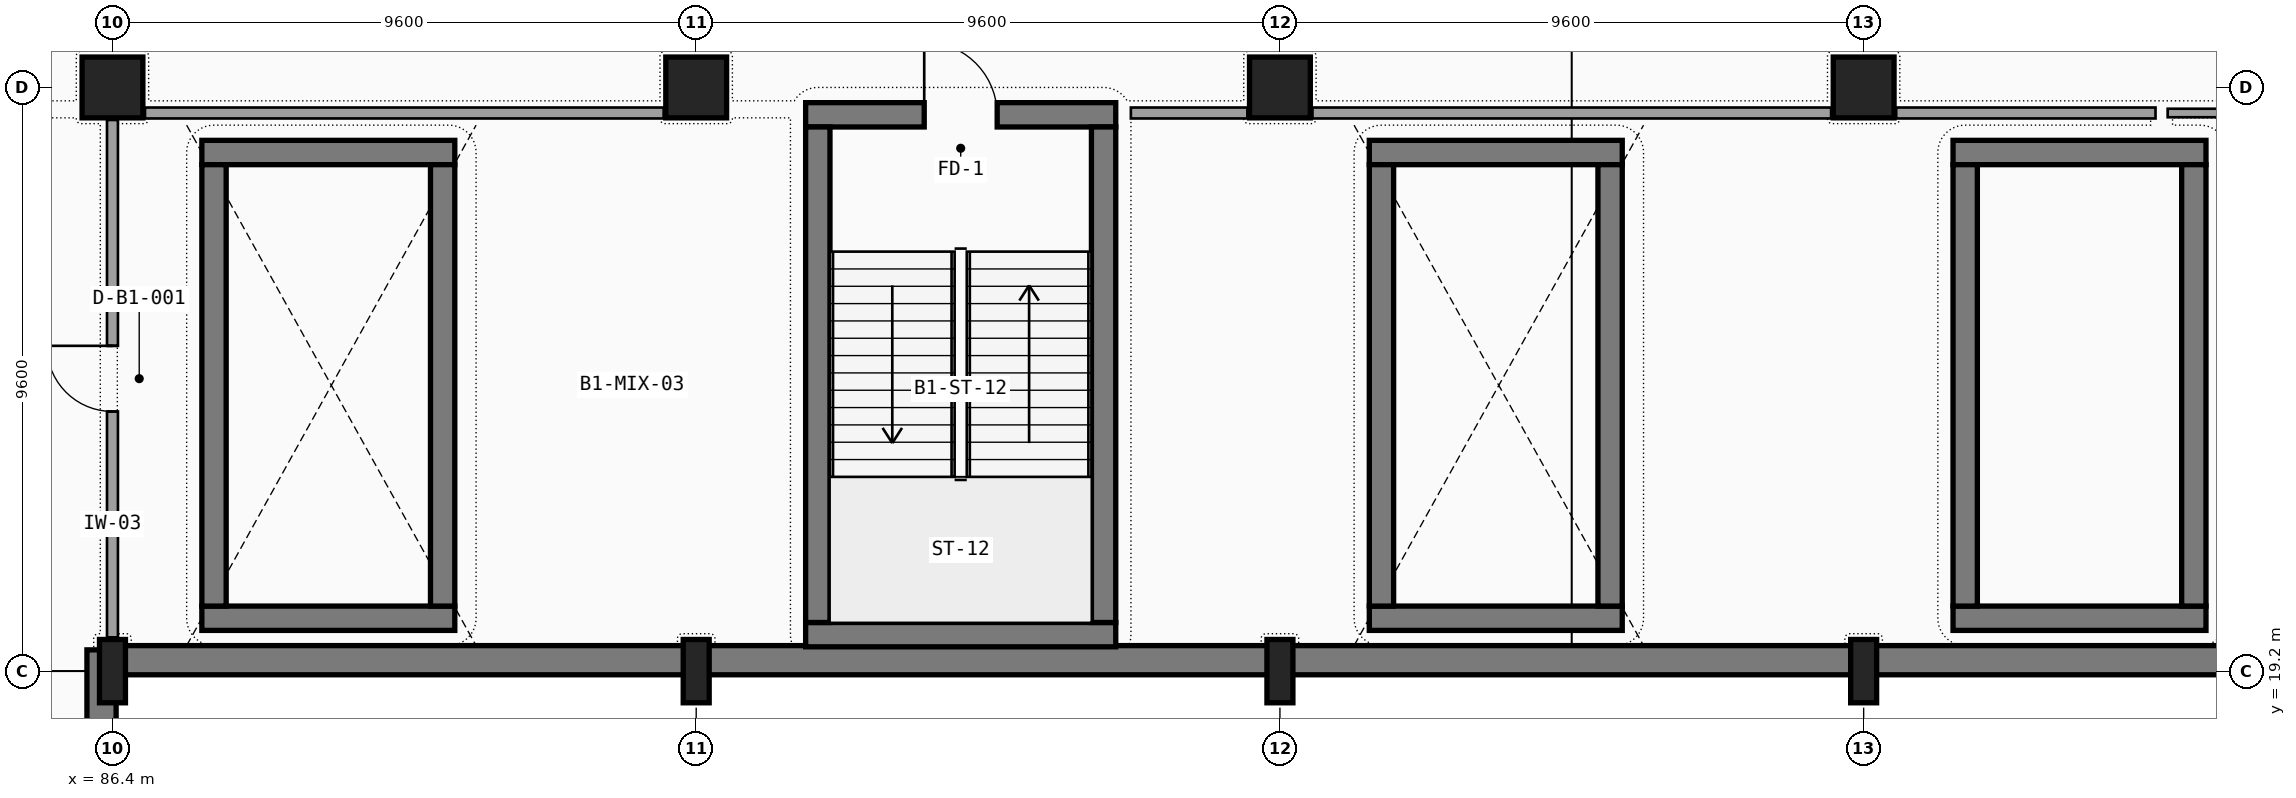
"""IFC4 building model, lengths in metres.
Left out: names, types, materials, properties, quantities, classifications, styles, units other than length and angle.
Written with IfcOpenShell. Run it as: python <this file> out.ifc"""

import sys

from ifc_helpers import new_model, si_unit, direction, frame, frame_2d, origin, origin_2d, place, context, subcontext, project, spatial, rectangle, i_section, extrude, element, fill, save


model = new_model("IFC4")
c1 = context("Model", 3, precision=1e-05, world=origin(), true_north=direction((0.0, 1.0)))
c2 = subcontext(c1, "Body", "Model", "MODEL_VIEW")
j1 = project(units=[si_unit("LENGTHUNIT", "METRE"), si_unit("PLANEANGLEUNIT", "RADIAN")], contexts=[c1])
p1 = place(None, origin())
s1 = spatial("IfcSite", under=j1, at=p1, CompositionType="ELEMENT")
p2 = place(p1, origin())
s2 = spatial("IfcBuilding", under=s1, at=p2, CompositionType="ELEMENT")
p3 = place(p2, frame((0.0, 0.0, -4.8)))
s3 = spatial("IfcBuildingStorey", under=s2, at=p3, CompositionType="ELEMENT", Elevation=-4.8)
p4 = place(p3, frame((86.4, 19.2, 0.0), z_axis=(0.0, 0.0, 1.0), x_axis=(1.0, 0.0, 0.0)))
e1 = element("IfcColumn", 1, at=p4, inside=s3, PredefinedType="COLUMN", context=c2, shape_type="SweptSolid", body=[
    extrude(i_section(OverallWidth=0.427, OverallDepth=1.042, WebThickness=0.031, FlangeThickness=0.056, FilletRadius=0.031, at=origin_2d()), origin(), (0.0, 0.0, 1.0), 4.8),
])
p5 = place(p3, frame((86.4, 28.8, 0.0), z_axis=(0.0, 0.0, 1.0), x_axis=(1.0, 0.0, 0.0)))
e2 = element("IfcColumn", 2, at=p5, inside=s3, PredefinedType="COLUMN", context=c2, shape_type="SweptSolid", body=[
    extrude(rectangle(XDim=1.0, YDim=1.0, at=origin_2d()), origin(), (0.0, 0.0, 1.0), 4.8),
])
p6 = place(p3, frame((96.0, 19.2, 0.0), z_axis=(0.0, 0.0, 1.0), x_axis=(1.0, 0.0, 0.0)))
e3 = element("IfcColumn", 3, at=p6, inside=s3, PredefinedType="COLUMN", context=c2, shape_type="SweptSolid", body=[
    extrude(i_section(OverallWidth=0.427, OverallDepth=1.042, WebThickness=0.031, FlangeThickness=0.056, FilletRadius=0.031, at=origin_2d()), origin(), (0.0, 0.0, 1.0), 4.8),
])
p7 = place(p3, frame((96.0, 28.8, 0.0), z_axis=(0.0, 0.0, 1.0), x_axis=(1.0, 0.0, 0.0)))
e4 = element("IfcColumn", 4, at=p7, inside=s3, PredefinedType="COLUMN", context=c2, shape_type="SweptSolid", body=[
    extrude(rectangle(XDim=1.0, YDim=1.0, at=origin_2d()), origin(), (0.0, 0.0, 1.0), 4.8),
])
p8 = place(p3, frame((105.6, 19.2, 0.0), z_axis=(0.0, 0.0, 1.0), x_axis=(1.0, 0.0, 0.0)))
e5 = element("IfcColumn", 5, at=p8, inside=s3, PredefinedType="COLUMN", context=c2, shape_type="SweptSolid", body=[
    extrude(i_section(OverallWidth=0.427, OverallDepth=1.042, WebThickness=0.031, FlangeThickness=0.056, FilletRadius=0.031, at=origin_2d()), origin(), (0.0, 0.0, 1.0), 4.8),
])
p9 = place(p3, frame((105.6, 28.8, 0.0), z_axis=(0.0, 0.0, 1.0), x_axis=(1.0, 0.0, 0.0)))
e6 = element("IfcColumn", 6, at=p9, inside=s3, PredefinedType="COLUMN", context=c2, shape_type="SweptSolid", body=[
    extrude(rectangle(XDim=1.0, YDim=1.0, at=origin_2d()), origin(), (0.0, 0.0, 1.0), 4.8),
])
p10 = place(p3, frame((115.2, 19.2, 0.0), z_axis=(0.0, 0.0, 1.0), x_axis=(1.0, 0.0, 0.0)))
e7 = element("IfcColumn", 7, at=p10, inside=s3, PredefinedType="COLUMN", context=c2, shape_type="SweptSolid", body=[
    extrude(i_section(OverallWidth=0.427, OverallDepth=1.042, WebThickness=0.031, FlangeThickness=0.056, FilletRadius=0.031, at=origin_2d()), origin(), (0.0, 0.0, 1.0), 4.8),
])
p11 = place(p3, frame((115.2, 28.8, 0.0), z_axis=(0.0, 0.0, 1.0), x_axis=(1.0, 0.0, 0.0)))
e8 = element("IfcColumn", 8, at=p11, inside=s3, PredefinedType="COLUMN", context=c2, shape_type="SweptSolid", body=[
    extrude(rectangle(XDim=1.0, YDim=1.0, at=origin_2d()), origin(), (0.0, 0.0, 1.0), 4.8),
])
p12 = place(p3, frame((86.22, 9.6, 0.0), z_axis=(0.0, 0.0, 1.0), x_axis=(0.0, 1.0, 0.0)))
e9 = element("IfcWall", 9, at=p12, inside=s3, PredefinedType="USERDEFINED", context=c2, shape_type="SweptSolid", body=[
    extrude(rectangle(XDim=9.95, YDim=0.48, at=frame_2d((4.975, 0.0))), origin(), (0.0, 0.0, 1.0), 3.573),
])
for number, where, z_axis, x_axis in (
    (10, (86.4, 19.38, 0.0), (0.0, 0.0, 1.0), (1.0, 0.0, 0.0)),
    (11, (96.0, 19.38, 0.0), (0.0, 0.0, 1.0), (1.0, 0.0, 0.0)),
):
    element("IfcWall", number, at=place(p3, frame(where, z_axis=z_axis, x_axis=x_axis)), inside=s3, PredefinedType="USERDEFINED", context=c2, shape_type="SweptSolid", body=[
        extrude(rectangle(XDim=9.6, YDim=0.48, at=frame_2d((4.8, 0.0))), origin(), (0.0, 0.0, 1.0), 3.573),
    ])
p13 = place(p3, frame((105.6, 19.38, 0.0), z_axis=(0.0, 0.0, 1.0), x_axis=(1.0, 0.0, 0.0)))
e12 = element("IfcWall", 12, at=p13, inside=s3, PredefinedType="USERDEFINED", context=c2, shape_type="SweptSolid", body=[
    extrude(rectangle(XDim=9.6, YDim=0.48, at=frame_2d((4.8, 0.0))), origin(), (0.0, 0.0, 1.0), 3.573),
])
p14 = place(p3, frame((115.2, 19.38, 0.0), z_axis=(0.0, 0.0, 1.0), x_axis=(1.0, 0.0, 0.0)))
e13 = element("IfcWall", 13, at=p14, inside=s3, PredefinedType="USERDEFINED", context=c2, shape_type="SweptSolid", body=[
    extrude(rectangle(XDim=9.6, YDim=0.48, at=frame_2d((4.8, 0.0))), origin(), (0.0, 0.0, 1.0), 3.573),
])
p15 = place(p3, frame((97.8, 19.8, 0.0), z_axis=(0.0, 0.0, 1.0), x_axis=(1.0, 0.0, 0.0)))
e14 = element("IfcWall", 14, at=p15, inside=s3, PredefinedType="SHEAR", context=c2, shape_type="SweptSolid", body=[
    extrude(rectangle(XDim=5.1, YDim=0.4, at=frame_2d((2.55, 0.0))), origin(), (0.0, 0.0, 1.0), 4.5),
])
p16 = place(p3, frame((102.9, 28.35, 0.0), z_axis=(0.0, 0.0, 1.0), x_axis=(-1.0, 0.0, 0.0)))
e15 = element("IfcWall", 15, at=p16, inside=s3, PredefinedType="SHEAR", context=c2, shape_type="SweptSolid", body=[
    extrude(rectangle(XDim=5.1, YDim=0.4, at=frame_2d((2.55, 0.0))), origin(), (0.0, 0.0, 1.0), 4.5),
])
p17 = place(p16, frame((3.15, 0.0, 0.0), z_axis=(0.0, 0.0, 1.0), x_axis=(-1.0, 0.0, 0.0)))
e16 = element("IfcOpeningElement", 16, at=p17, cuts=e15, PredefinedType="OPENING", context=c2, shape_type="SweptSolid", body=[
    extrude(rectangle(XDim=1.2, YDim=2.2, at=frame_2d((0.6, 1.1))), frame((0.0, 0.21, 0.0), z_axis=(0.0, -1.0, 0.0), x_axis=(1.0, 0.0, 0.0)), (0.0, 0.0, 1.0), 0.42),
])
for number, where, z_axis, x_axis in (
    (17, (98.0, 28.15, 0.0), (0.0, 0.0, 1.0), (0.0, -1.0, 0.0)),
    (18, (102.7, 20.0, 0.0), (0.0, 0.0, 1.0), (0.0, 1.0, 0.0)),
):
    element("IfcWall", number, at=place(p3, frame(where, z_axis=z_axis, x_axis=x_axis)), inside=s3, PredefinedType="SHEAR", context=c2, shape_type="SweptSolid", body=[
        extrude(rectangle(XDim=8.15, YDim=0.4, at=frame_2d((4.075, 0.0))), origin(), (0.0, 0.0, 1.0), 4.5),
    ])
for number, where, z_axis, x_axis in (
    (19, (87.87, 20.07, 0.0), (0.0, 0.0, 1.0), (1.0, 0.0, 0.0)),
    (20, (92.03, 27.73, 0.0), (0.0, 0.0, 1.0), (-1.0, 0.0, 0.0)),
):
    element("IfcWall", number, at=place(p3, frame(where, z_axis=z_axis, x_axis=x_axis)), inside=s3, PredefinedType="SHEAR", context=c2, shape_type="SweptSolid", body=[
        extrude(rectangle(XDim=4.16, YDim=0.4, at=frame_2d((2.08, 0.0))), origin(), (0.0, 0.0, 1.0), 4.5),
    ])
for number, where, z_axis, x_axis in (
    (21, (88.07, 27.53, 0.0), (0.0, 0.0, 1.0), (0.0, -1.0, 0.0)),
    (22, (91.83, 20.27, 0.0), (0.0, 0.0, 1.0), (0.0, 1.0, 0.0)),
):
    element("IfcWall", number, at=place(p3, frame(where, z_axis=z_axis, x_axis=x_axis)), inside=s3, PredefinedType="SHEAR", context=c2, shape_type="SweptSolid", body=[
        extrude(rectangle(XDim=7.26, YDim=0.4, at=frame_2d((3.63, 0.0))), origin(), (0.0, 0.0, 1.0), 4.5),
    ])
for number, where, z_axis, x_axis in (
    (23, (107.07, 20.07, 0.0), (0.0, 0.0, 1.0), (1.0, 0.0, 0.0)),
    (24, (111.23, 27.73, 0.0), (0.0, 0.0, 1.0), (-1.0, 0.0, 0.0)),
):
    element("IfcWall", number, at=place(p3, frame(where, z_axis=z_axis, x_axis=x_axis)), inside=s3, PredefinedType="SHEAR", context=c2, shape_type="SweptSolid", body=[
        extrude(rectangle(XDim=4.16, YDim=0.4, at=frame_2d((2.08, 0.0))), origin(), (0.0, 0.0, 1.0), 4.5),
    ])
for number, where, z_axis, x_axis in (
    (25, (107.27, 27.53, 0.0), (0.0, 0.0, 1.0), (0.0, -1.0, 0.0)),
    (26, (111.03, 20.27, 0.0), (0.0, 0.0, 1.0), (0.0, 1.0, 0.0)),
):
    element("IfcWall", number, at=place(p3, frame(where, z_axis=z_axis, x_axis=x_axis)), inside=s3, PredefinedType="SHEAR", context=c2, shape_type="SweptSolid", body=[
        extrude(rectangle(XDim=7.26, YDim=0.4, at=frame_2d((3.63, 0.0))), origin(), (0.0, 0.0, 1.0), 4.5),
    ])
for number, where, z_axis, x_axis in (
    (27, (116.67, 20.07, 0.0), (0.0, 0.0, 1.0), (1.0, 0.0, 0.0)),
    (28, (120.83, 27.73, 0.0), (0.0, 0.0, 1.0), (-1.0, 0.0, 0.0)),
):
    element("IfcWall", number, at=place(p3, frame(where, z_axis=z_axis, x_axis=x_axis)), inside=s3, PredefinedType="SHEAR", context=c2, shape_type="SweptSolid", body=[
        extrude(rectangle(XDim=4.16, YDim=0.4, at=frame_2d((2.08, 0.0))), origin(), (0.0, 0.0, 1.0), 4.5),
    ])
for number, where, z_axis, x_axis in (
    (29, (116.87, 27.53, 0.0), (0.0, 0.0, 1.0), (0.0, -1.0, 0.0)),
    (30, (120.63, 20.27, 0.0), (0.0, 0.0, 1.0), (0.0, 1.0, 0.0)),
):
    element("IfcWall", number, at=place(p3, frame(where, z_axis=z_axis, x_axis=x_axis)), inside=s3, PredefinedType="SHEAR", context=c2, shape_type="SweptSolid", body=[
        extrude(rectangle(XDim=7.26, YDim=0.4, at=frame_2d((3.63, 0.0))), origin(), (0.0, 0.0, 1.0), 4.5),
    ])
p18 = place(p3, frame((86.4, 19.756, 0.0), z_axis=(0.0, 0.0, 1.0), x_axis=(0.0, 1.0, 0.0)))
e31 = element("IfcWall", 31, at=p18, inside=s3, PredefinedType="PARTITIONING", context=c2, shape_type="SweptSolid", body=[
    extrude(rectangle(XDim=8.509, YDim=0.18, at=frame_2d((4.255, 0.0))), origin(), (0.0, 0.0, 1.0), 3.7),
])
p19 = place(p18, frame((3.715, 0.0, 0.0), z_axis=(0.0, 0.0, 1.0), x_axis=(1.0, 0.0, 0.0)))
e32 = element("IfcOpeningElement", 32, at=p19, cuts=e31, PredefinedType="OPENING", context=c2, shape_type="SweptSolid", body=[
    extrude(rectangle(XDim=1.08, YDim=2.22, at=frame_2d((0.54, 1.11))), frame((0.0, 0.1, 0.0), z_axis=(0.0, -1.0, 0.0), x_axis=(1.0, 0.0, 0.0)), (0.0, 0.0, 1.0), 0.2),
])
p20 = place(p3, frame((86.935, 28.38, 0.0), z_axis=(0.0, 0.0, 1.0), x_axis=(1.0, 0.0, 0.0)))
e33 = element("IfcWall", 33, at=p20, inside=s3, PredefinedType="PARTITIONING", context=c2, shape_type="SweptSolid", body=[
    extrude(rectangle(XDim=8.53, YDim=0.18, at=frame_2d((4.265, 0.0))), origin(), (0.0, 0.0, 1.0), 4.5),
])
p21 = place(p3, frame((103.148, 28.38, 0.0), z_axis=(0.0, 0.0, 1.0), x_axis=(1.0, 0.0, 0.0)))
e34 = element("IfcWall", 34, at=p21, inside=s3, PredefinedType="PARTITIONING", context=c2, shape_type="SweptSolid", body=[
    extrude(rectangle(XDim=1.917, YDim=0.18, at=frame_2d((0.958, 0.0))), origin(), (0.0, 0.0, 1.0), 4.5),
])
p22 = place(p3, frame((106.135, 28.38, 0.0), z_axis=(0.0, 0.0, 1.0), x_axis=(1.0, 0.0, 0.0)))
e35 = element("IfcWall", 35, at=p22, inside=s3, PredefinedType="PARTITIONING", context=c2, shape_type="SweptSolid", body=[
    extrude(rectangle(XDim=8.53, YDim=0.18, at=frame_2d((4.265, 0.0))), origin(), (0.0, 0.0, 1.0), 4.5),
])
p23 = place(p3, frame((115.735, 28.38, 0.0), z_axis=(0.0, 0.0, 1.0), x_axis=(1.0, 0.0, 0.0)))
e36 = element("IfcWall", 36, at=p23, inside=s3, PredefinedType="PARTITIONING", context=c2, shape_type="SweptSolid", body=[
    extrude(rectangle(XDim=4.265, YDim=0.18, at=frame_2d((2.132, 0.0))), origin(), (0.0, 0.0, 1.0), 4.5),
])
p24 = place(p3, frame((120.2, 28.38, 0.0), z_axis=(0.0, 0.0, 1.0), x_axis=(1.0, 0.0, 0.0)))
e37 = element("IfcWall", 37, at=p24, inside=s3, PredefinedType="PARTITIONING", context=c2, shape_type="SweptSolid", body=[
    extrude(rectangle(XDim=4.065, YDim=0.14, at=frame_2d((2.032, 0.0))), origin(), (0.0, 0.0, 1.0), 4.5),
])
p25 = place(p17, origin())
e38 = element("IfcDoor", 38, at=p25, inside=s3, OperationType="SINGLE_SWING_LEFT", PredefinedType="DOOR", context=c2, shape_type="SweptSolid", body=[
    extrude(rectangle(XDim=1.2, YDim=2.2, at=frame_2d((0.6, 1.1))), frame((0.0, 0.025, 0.0), z_axis=(0.0, -1.0, 0.0), x_axis=(1.0, 0.0, 0.0)), (0.0, 0.0, 1.0), 0.05),
])
fill(e16, e38)
p26 = place(p19, origin())
e39 = element("IfcDoor", 39, at=p26, inside=s3, OperationType="SINGLE_SWING_RIGHT", PredefinedType="DOOR", context=c2, shape_type="SweptSolid", body=[
    extrude(rectangle(XDim=1.08, YDim=2.22, at=frame_2d((0.54, 1.11))), frame((0.0, 0.025, 0.0), z_axis=(0.0, -1.0, 0.0), x_axis=(1.0, 0.0, 0.0)), (0.0, 0.0, 1.0), 0.05),
])
fill(e32, e39)
save(model, sys.argv[1])
